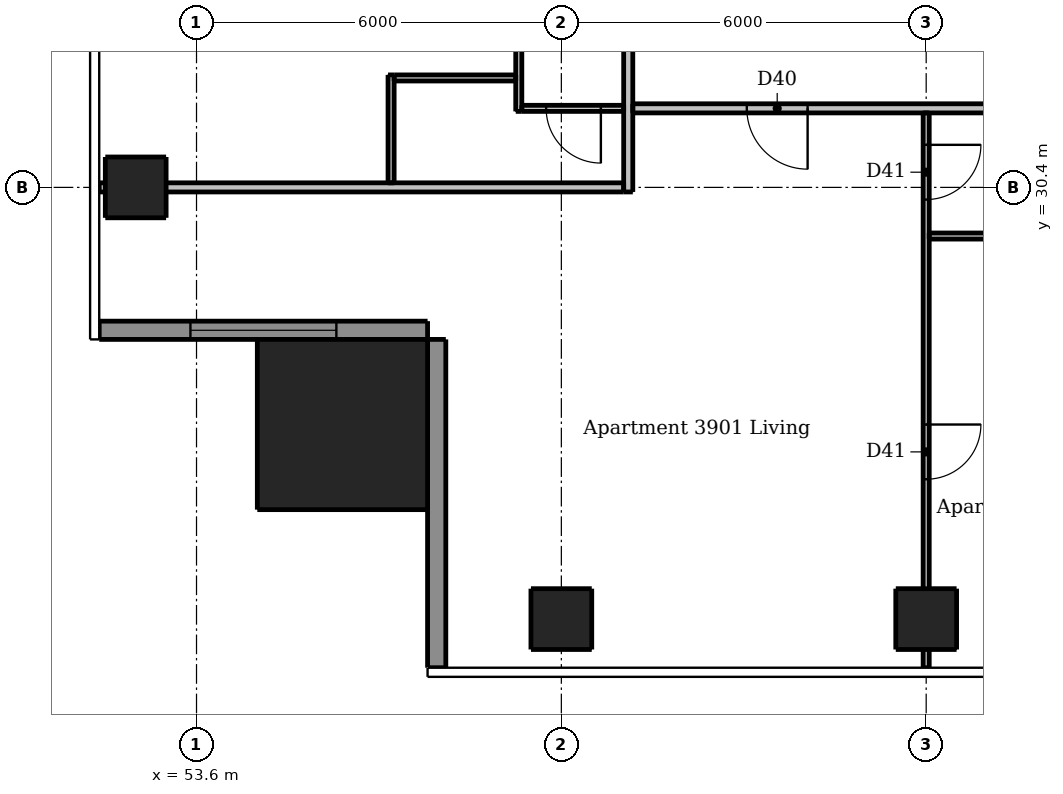
"""IFC4 building model, lengths in metres.
Left out: names, types, materials, properties, quantities, classifications, styles, units other than length and angle.
Written with IfcOpenShell. Run it as: python <this file> out.ifc"""

import sys

from ifc_helpers import new_model, si_unit, direction, frame, frame_2d, origin, origin_2d, place, context, subcontext, project, spatial, rectangle, extrude, element, fill, save


model = new_model("IFC4")
c1 = context("Model", 3, precision=1e-05, world=origin(), true_north=direction((0.0, 1.0)))
c2 = subcontext(c1, "Body", "Model", "MODEL_VIEW")
j1 = project(units=[si_unit("LENGTHUNIT", "METRE"), si_unit("PLANEANGLEUNIT", "RADIAN")], contexts=[c1])
p1 = place(None, origin())
s1 = spatial("IfcSite", under=j1, at=p1, CompositionType="ELEMENT")
p2 = place(p1, origin())
s2 = spatial("IfcBuilding", under=s1, at=p2, CompositionType="ELEMENT")
p3 = place(p2, frame((0.0, 0.0, 147.1)))
s3 = spatial("IfcBuildingStorey", under=s2, at=p3, CompositionType="ELEMENT", Elevation=147.1)
for number, where, z_axis, x_axis in (
    (1, (59.6, 23.3, 0.0), (0.0, 0.0, 1.0), (1.0, 0.0, 0.0)),
    (2, (65.6, 23.3, 0.0), (0.0, 0.0, 1.0), (1.0, 0.0, 0.0)),
    (3, (52.6, 30.4, 0.0), (0.0, 0.0, 1.0), (1.0, 0.0, 0.0)),
):
    element("IfcColumn", number, at=place(p3, frame(where, z_axis=z_axis, x_axis=x_axis)), inside=s3, PredefinedType="COLUMN", context=c2, shape_type="SweptSolid", body=[
        extrude(rectangle(XDim=1.0, YDim=1.0, at=origin_2d()), origin(), (0.0, 0.0, 1.0), 3.0),
    ])
p4 = place(p3, frame((56.0, 26.5, 0.0), z_axis=(0.0, 0.0, 1.0), x_axis=(1.0, 0.0, 0.0)))
e4 = element("IfcColumn", 4, at=p4, inside=s3, PredefinedType="COLUMN", context=c2, shape_type="SweptSolid", body=[
    extrude(rectangle(XDim=2.8, YDim=2.8, at=origin_2d()), origin(), (0.0, 0.0, 1.0), 3.3),
])
p5 = place(p3, frame((52.0, 28.05, 0.0), z_axis=(0.0, 0.0, 1.0), x_axis=(1.0, 0.0, 0.0)))
e5 = element("IfcWall", 5, at=p5, inside=s3, PredefinedType="SOLIDWALL", context=c2, shape_type="SweptSolid", body=[
    extrude(rectangle(XDim=5.4, YDim=0.3, at=frame_2d((2.7, 0.0))), origin(), (0.0, 0.0, 1.0), 3.0),
])
p6 = place(p5, frame((1.5, 0.0, 0.15)))
e6 = element("IfcOpeningElement", 6, at=p6, cuts=e5, PredefinedType="OPENING", context=c2, shape_type="SweptSolid", body=[
    extrude(rectangle(XDim=2.4, YDim=2.1, at=frame_2d((1.2, 1.05))), frame((0.0, 0.16, 0.0), z_axis=(0.0, -1.0, 0.0), x_axis=(1.0, 0.0, 0.0)), (0.0, 0.0, 1.0), 0.32),
])
p7 = place(p3, frame((57.55, 27.9, 0.0), z_axis=(0.0, 0.0, 1.0), x_axis=(0.0, -1.0, 0.0)))
e7 = element("IfcWall", 7, at=p7, inside=s3, PredefinedType="SOLIDWALL", context=c2, shape_type="SweptSolid", body=[
    extrude(rectangle(XDim=5.4, YDim=0.3, at=frame_2d((2.7, 0.0))), origin(), (0.0, 0.0, 1.0), 3.0),
])
p8 = place(p3, frame((56.8, 30.475, 0.0), z_axis=(0.0, 0.0, 1.0), x_axis=(0.0, 1.0, 0.0)))
e8 = element("IfcWall", 8, at=p8, inside=s3, PredefinedType="PARTITIONING", context=c2, shape_type="SweptSolid", body=[
    extrude(rectangle(XDim=1.775, YDim=0.1, at=frame_2d((0.887, 0.0))), origin(), (0.0, 0.0, 1.0), 3.0),
])
p9 = place(p3, frame((58.9, 31.65, 0.0), z_axis=(0.0, 0.0, 1.0), x_axis=(0.0, 1.0, 0.0)))
e9 = element("IfcWall", 9, at=p9, inside=s3, PredefinedType="PARTITIONING", context=c2, shape_type="SweptSolid", body=[
    extrude(rectangle(XDim=16.675, YDim=0.1, at=frame_2d((8.337, 0.0))), origin(), (0.0, 0.0, 1.0), 3.0),
])
p10 = place(p9, frame((2.8, 0.0, 0.0)))
e10 = element("IfcOpeningElement", 10, at=p10, cuts=e9, PredefinedType="OPENING", context=c2, shape_type="SweptSolid", body=[
    extrude(rectangle(XDim=0.9, YDim=2.1, at=frame_2d((0.45, 1.05))), frame((0.0, 0.06, 0.0), z_axis=(0.0, -1.0, 0.0), x_axis=(1.0, 0.0, 0.0)), (0.0, 0.0, 1.0), 0.12),
])
p11 = place(p9, frame((8.8, 0.0, 0.0)))
e11 = element("IfcOpeningElement", 11, at=p11, cuts=e9, PredefinedType="OPENING", context=c2, shape_type="SweptSolid", body=[
    extrude(rectangle(XDim=0.9, YDim=2.1, at=frame_2d((0.45, 1.05))), frame((0.0, 0.06, 0.0), z_axis=(0.0, -1.0, 0.0), x_axis=(1.0, 0.0, 0.0)), (0.0, 0.0, 1.0), 0.12),
])
p12 = place(p9, frame((6.4, 0.0, 0.0)))
e12 = element("IfcOpeningElement", 12, at=p12, cuts=e9, PredefinedType="OPENING", context=c2, shape_type="SweptSolid", body=[
    extrude(rectangle(XDim=0.9, YDim=2.1, at=frame_2d((0.45, 1.05))), frame((0.0, 0.06, 0.0), z_axis=(0.0, -1.0, 0.0), x_axis=(1.0, 0.0, 0.0)), (0.0, 0.0, 1.0), 0.12),
])
p13 = place(p9, frame((14.5, 0.0, 0.0)))
e13 = element("IfcOpeningElement", 13, at=p13, cuts=e9, PredefinedType="OPENING", context=c2, shape_type="SweptSolid", body=[
    extrude(rectangle(XDim=0.9, YDim=2.1, at=frame_2d((0.45, 1.05))), frame((0.0, 0.06, 0.0), z_axis=(0.0, -1.0, 0.0), x_axis=(1.0, 0.0, 0.0)), (0.0, 0.0, 1.0), 0.12),
])
p14 = place(p9, frame((11.55, 0.0, 0.0)))
e14 = element("IfcOpeningElement", 14, at=p14, cuts=e9, PredefinedType="OPENING", context=c2, shape_type="SweptSolid", body=[
    extrude(rectangle(XDim=0.8, YDim=2.1, at=frame_2d((0.4, 1.05))), frame((0.0, 0.06, 0.0), z_axis=(0.0, -1.0, 0.0), x_axis=(1.0, 0.0, 0.0)), (0.0, 0.0, 1.0), 0.12),
])
p15 = place(p3, frame((65.6, 31.625, 0.0), z_axis=(0.0, 0.0, 1.0), x_axis=(0.0, -1.0, 0.0)))
e15 = element("IfcWall", 15, at=p15, inside=s3, PredefinedType="PARTITIONING", context=c2, shape_type="SweptSolid", body=[
    extrude(rectangle(XDim=9.125, YDim=0.1, at=frame_2d((4.562, 0.0))), origin(), (0.0, 0.0, 1.0), 2.466),
])
p16 = place(p15, frame((0.525, 0.0, 0.0)))
e16 = element("IfcOpeningElement", 16, at=p16, cuts=e15, PredefinedType="OPENING", context=c2, shape_type="SweptSolid", body=[
    extrude(rectangle(XDim=0.9, YDim=2.1, at=frame_2d((0.45, 1.05))), frame((0.0, 0.06, 0.0), z_axis=(0.0, -1.0, 0.0), x_axis=(1.0, 0.0, 0.0)), (0.0, 0.0, 1.0), 0.12),
])
p17 = place(p15, frame((5.125, 0.0, 0.0)))
e17 = element("IfcOpeningElement", 17, at=p17, cuts=e15, PredefinedType="OPENING", context=c2, shape_type="SweptSolid", body=[
    extrude(rectangle(XDim=0.9, YDim=2.1, at=frame_2d((0.45, 1.05))), frame((0.0, 0.06, 0.0), z_axis=(0.0, -1.0, 0.0), x_axis=(1.0, 0.0, 0.0)), (0.0, 0.0, 1.0), 0.12),
])
p18 = place(p3, frame((56.85, 32.2, 0.0), z_axis=(0.0, 0.0, 1.0), x_axis=(1.0, 0.0, 0.0)))
e18 = element("IfcWall", 18, at=p18, inside=s3, PredefinedType="PARTITIONING", context=c2, shape_type="SweptSolid", body=[
    extrude(rectangle(XDim=2.0, YDim=0.1, at=frame_2d((1.0, 0.0))), origin(), (0.0, 0.0, 1.0), 3.0),
])
p19 = place(p3, frame((60.625, 31.7, 0.0), z_axis=(0.0, 0.0, 1.0), x_axis=(-1.0, 0.0, 0.0)))
e19 = element("IfcWall", 19, at=p19, inside=s3, PredefinedType="PARTITIONING", context=c2, shape_type="SweptSolid", body=[
    extrude(rectangle(XDim=1.675, YDim=0.1, at=frame_2d((0.837, 0.0))), origin(), (0.0, 0.0, 1.0), 3.0),
])
p20 = place(p19, frame((0.375, 0.0, 0.0)))
e20 = element("IfcOpeningElement", 20, at=p20, cuts=e19, PredefinedType="OPENING", context=c2, shape_type="SweptSolid", body=[
    extrude(rectangle(XDim=0.9, YDim=2.1, at=frame_2d((0.45, 1.05))), frame((0.0, 0.06, 0.0), z_axis=(0.0, -1.0, 0.0), x_axis=(1.0, 0.0, 0.0)), (0.0, 0.0, 1.0), 0.12),
])
p21 = place(p3, frame((65.65, 29.6, 0.0), z_axis=(0.0, 0.0, 1.0), x_axis=(1.0, 0.0, 0.0)))
e21 = element("IfcWall", 21, at=p21, inside=s3, PredefinedType="PARTITIONING", context=c2, shape_type="SweptSolid", body=[
    extrude(rectangle(XDim=8.9, YDim=0.1, at=frame_2d((4.45, 0.0))), origin(), (0.0, 0.0, 1.0), 3.0),
])
p22 = place(p21, frame((3.75, 0.0, 0.0)))
e22 = element("IfcOpeningElement", 22, at=p22, cuts=e21, PredefinedType="OPENING", context=c2, shape_type="SweptSolid", body=[
    extrude(rectangle(XDim=0.8, YDim=2.1, at=frame_2d((0.4, 1.05))), frame((0.0, 0.06, 0.0), z_axis=(0.0, -1.0, 0.0), x_axis=(1.0, 0.0, 0.0)), (0.0, 0.0, 1.0), 0.12),
])
p23 = place(p21, frame((7.0, 0.0, 0.0)))
e23 = element("IfcOpeningElement", 23, at=p23, cuts=e21, PredefinedType="OPENING", context=c2, shape_type="SweptSolid", body=[
    extrude(rectangle(XDim=0.9, YDim=2.1, at=frame_2d((0.45, 1.05))), frame((0.0, 0.06, 0.0), z_axis=(0.0, -1.0, 0.0), x_axis=(1.0, 0.0, 0.0)), (0.0, 0.0, 1.0), 0.12),
])
p24 = place(p3, frame((60.7, 30.325, 0.0), z_axis=(0.0, 0.0, 1.0), x_axis=(0.0, 1.0, 0.0)))
e24 = element("IfcWall", 24, at=p24, inside=s3, PredefinedType="PARTITIONING", context=c2, shape_type="SweptSolid", body=[
    extrude(rectangle(XDim=28.9, YDim=0.15, at=frame_2d((14.45, 0.0))), origin(), (0.0, 0.0, 1.0), 3.0),
])
p25 = place(p24, frame((9.225, 0.0, 0.0)))
e25 = element("IfcOpeningElement", 25, at=p25, cuts=e24, PredefinedType="OPENING", context=c2, shape_type="SweptSolid", body=[
    extrude(rectangle(XDim=1.0, YDim=2.1, at=frame_2d((0.5, 1.05))), frame((0.0, 0.085, 0.0), z_axis=(0.0, -1.0, 0.0), x_axis=(1.0, 0.0, 0.0)), (0.0, 0.0, 1.0), 0.17),
])
p26 = place(p24, frame((26.025, 0.0, 0.0)))
e26 = element("IfcOpeningElement", 26, at=p26, cuts=e24, PredefinedType="OPENING", context=c2, shape_type="SweptSolid", body=[
    extrude(rectangle(XDim=1.0, YDim=2.1, at=frame_2d((0.5, 1.05))), frame((0.0, 0.085, 0.0), z_axis=(0.0, -1.0, 0.0), x_axis=(1.0, 0.0, 0.0)), (0.0, 0.0, 1.0), 0.17),
])
p27 = place(p3, frame((89.525, 31.7, 0.0), z_axis=(0.0, 0.0, 1.0), x_axis=(-1.0, 0.0, 0.0)))
e27 = element("IfcWall", 27, at=p27, inside=s3, PredefinedType="PARTITIONING", context=c2, shape_type="SweptSolid", body=[
    extrude(rectangle(XDim=28.75, YDim=0.15, at=frame_2d((14.375, 0.0))), origin(), (0.0, 0.0, 1.0), 3.0),
])
p28 = place(p27, frame((25.875, 0.0, 0.0)))
e28 = element("IfcOpeningElement", 28, at=p28, cuts=e27, PredefinedType="OPENING", context=c2, shape_type="SweptSolid", body=[
    extrude(rectangle(XDim=1.0, YDim=2.1, at=frame_2d((0.5, 1.05))), frame((0.0, 0.085, 0.0), z_axis=(0.0, -1.0, 0.0), x_axis=(1.0, 0.0, 0.0)), (0.0, 0.0, 1.0), 0.17),
])
p29 = place(p27, frame((9.925, 0.0, 0.0)))
e29 = element("IfcOpeningElement", 29, at=p29, cuts=e27, PredefinedType="OPENING", context=c2, shape_type="SweptSolid", body=[
    extrude(rectangle(XDim=1.0, YDim=2.1, at=frame_2d((0.5, 1.05))), frame((0.0, 0.085, 0.0), z_axis=(0.0, -1.0, 0.0), x_axis=(1.0, 0.0, 0.0)), (0.0, 0.0, 1.0), 0.17),
])
p30 = place(p3, frame((52.0, 30.4, 0.0), z_axis=(0.0, 0.0, 1.0), x_axis=(1.0, 0.0, 0.0)))
e30 = element("IfcWall", 30, at=p30, inside=s3, PredefinedType="PARTITIONING", context=c2, shape_type="SweptSolid", body=[
    extrude(rectangle(XDim=8.625, YDim=0.15, at=frame_2d((4.312, 0.0))), origin(), (0.0, 0.0, 1.0), 2.597),
])
p31 = place(p6, origin())
e31 = element("IfcWindow", 31, at=p31, inside=s3, PartitioningType="DOUBLE_PANEL_VERTICAL", PredefinedType="WINDOW", context=c2, shape_type="SweptSolid", body=[
    extrude(rectangle(XDim=2.4, YDim=2.1, at=frame_2d((1.2, 1.05))), frame((0.0, 0.03, 0.0), z_axis=(0.0, -1.0, 0.0), x_axis=(1.0, 0.0, 0.0)), (0.0, 0.0, 1.0), 0.06),
])
fill(e6, e31)
p32 = place(p28, origin())
e32 = element("IfcDoor", 32, at=p32, inside=s3, OperationType="SINGLE_SWING_LEFT", PredefinedType="DOOR", context=c2, shape_type="SweptSolid", body=[
    extrude(rectangle(XDim=1.0, YDim=2.1, at=frame_2d((0.5, 1.05))), frame((0.0, 0.025, 0.0), z_axis=(0.0, -1.0, 0.0), x_axis=(1.0, 0.0, 0.0)), (0.0, 0.0, 1.0), 0.05),
])
fill(e28, e32)
p33 = place(p16, origin())
e33 = element("IfcDoor", 33, at=p33, inside=s3, OperationType="SINGLE_SWING_LEFT", PredefinedType="DOOR", context=c2, shape_type="SweptSolid", body=[
    extrude(rectangle(XDim=0.9, YDim=2.1, at=frame_2d((0.45, 1.05))), frame((0.0, 0.025, 0.0), z_axis=(0.0, -1.0, 0.0), x_axis=(1.0, 0.0, 0.0)), (0.0, 0.0, 1.0), 0.05),
])
fill(e16, e33)
p34 = place(p17, origin())
e34 = element("IfcDoor", 34, at=p34, inside=s3, OperationType="SINGLE_SWING_LEFT", PredefinedType="DOOR", context=c2, shape_type="SweptSolid", body=[
    extrude(rectangle(XDim=0.9, YDim=2.1, at=frame_2d((0.45, 1.05))), frame((0.0, 0.025, 0.0), z_axis=(0.0, -1.0, 0.0), x_axis=(1.0, 0.0, 0.0)), (0.0, 0.0, 1.0), 0.05),
])
fill(e17, e34)
p35 = place(p20, origin())
e35 = element("IfcDoor", 35, at=p35, inside=s3, OperationType="SINGLE_SWING_LEFT", PredefinedType="DOOR", context=c2, shape_type="SweptSolid", body=[
    extrude(rectangle(XDim=0.9, YDim=2.1, at=frame_2d((0.45, 1.05))), frame((0.0, 0.025, 0.0), z_axis=(0.0, -1.0, 0.0), x_axis=(1.0, 0.0, 0.0)), (0.0, 0.0, 1.0), 0.05),
])
fill(e20, e35)
save(model, sys.argv[1])
